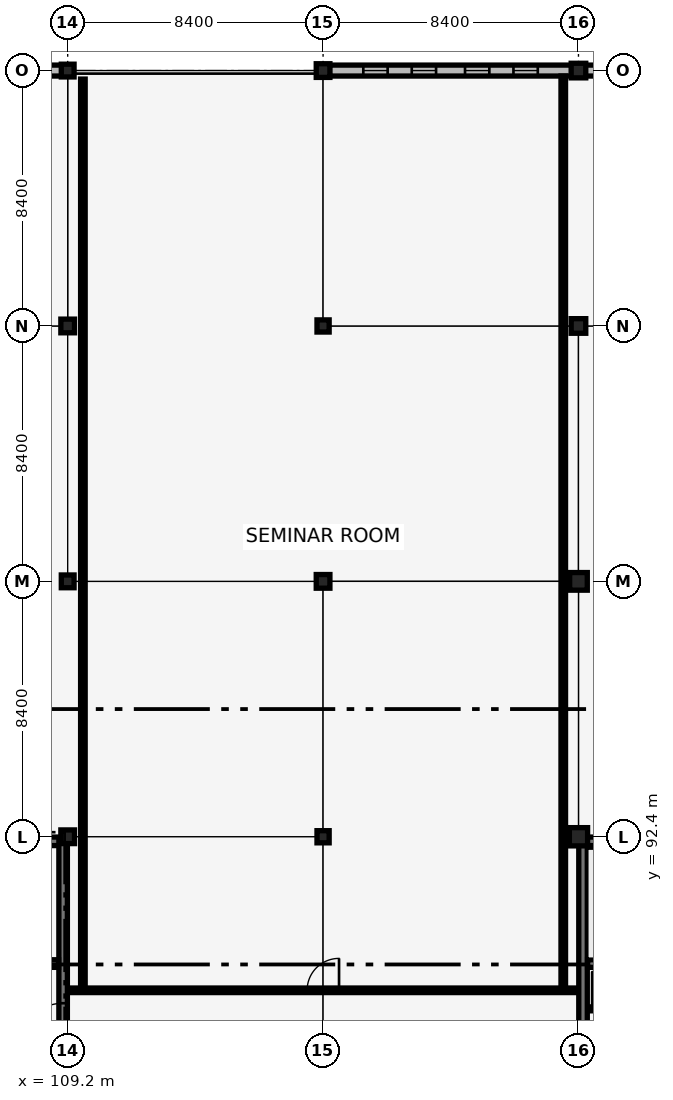
"""IFC4 building model, lengths in metres.
Left out: names, types, materials, properties, quantities, classifications, styles, units other than length and angle.
Written with IfcOpenShell. Run it as: python <this file> out.ifc"""

import sys

from ifc_helpers import new_model, si_unit, direction, frame, frame_2d, origin, origin_2d, place, context, subcontext, project, spatial, rectangle, extrude, element, fill, save


model = new_model("IFC4")
c1 = context("Model", 3, precision=1e-05, world=origin(), true_north=direction((0.0, 1.0)))
c2 = subcontext(c1, "Body", "Model", "MODEL_VIEW")
j1 = project(units=[si_unit("LENGTHUNIT", "METRE"), si_unit("PLANEANGLEUNIT", "RADIAN")], contexts=[c1])
p1 = place(None, origin())
s1 = spatial("IfcSite", under=j1, at=p1, CompositionType="ELEMENT")
p2 = place(p1, origin())
s2 = spatial("IfcBuilding", under=s1, at=p2, CompositionType="ELEMENT")
p3 = place(p2, frame((0.0, 0.0, 18.02)))
s3 = spatial("IfcBuildingStorey", under=s2, at=p3, CompositionType="ELEMENT", Elevation=18.02)
for number, where, z_axis, x_axis in (
    (1, (126.15, 92.25, 0.0), (0.0, 0.0, 1.0), (1.0, 0.0, 0.0)),
    (2, (126.15, 84.15, 0.0), (0.0, 0.0, 1.0), (0.0, 1.0, 0.0)),
):
    element("IfcWall", number, at=place(p3, frame(where, z_axis=z_axis, x_axis=x_axis)), inside=s3, PredefinedType="SHEAR", context=c2, shape_type="SweptSolid", body=[
        extrude(rectangle(XDim=8.1, YDim=0.28, at=frame_2d((4.05, 0.0))), origin(), (0.0, 0.0, 1.0), 3.78),
    ])
p4 = place(p3, frame((126.3, 88.23, 0.0), z_axis=(0.0, 0.0, 1.0), x_axis=(1.0, 0.0, 0.0)))
e3 = element("IfcWall", 3, at=p4, inside=s3, PredefinedType="SHEAR", context=c2, shape_type="SweptSolid", body=[
    extrude(rectangle(XDim=7.8, YDim=0.25, at=frame_2d((3.9, 0.0))), origin(), (0.0, 0.0, 1.0), 3.78),
])
p5 = place(p4, frame((6.2, 0.0, 0.0)))
e4 = element("IfcOpeningElement", 4, at=p5, cuts=e3, PredefinedType="OPENING", context=c2, shape_type="SweptSolid", body=[
    extrude(rectangle(XDim=1.35, YDim=2.15, at=frame_2d((0.675, 1.075))), frame((0.0, 0.135, 0.0), z_axis=(0.0, -1.0, 0.0), x_axis=(1.0, 0.0, 0.0)), (0.0, 0.0, 1.0), 0.27),
])
p6 = place(p3, frame((100.95, 92.25, 0.0), z_axis=(0.0, 0.0, 1.0), x_axis=(1.0, 0.0, 0.0)))
e5 = element("IfcWall", 5, at=p6, inside=s3, PredefinedType="SHEAR", context=c2, shape_type="SweptSolid", body=[
    extrude(rectangle(XDim=8.1, YDim=0.28, at=frame_2d((4.05, 0.0))), origin(), (0.0, 0.0, 1.0), 3.78),
])
p7 = place(p3, frame((109.05, 84.15, 0.0), z_axis=(0.0, 0.0, 1.0), x_axis=(0.0, 1.0, 0.0)))
e6 = element("IfcWall", 6, at=p7, inside=s3, PredefinedType="SHEAR", context=c2, shape_type="SweptSolid", body=[
    extrude(rectangle(XDim=8.1, YDim=0.28, at=frame_2d((4.05, 0.0))), origin(), (0.0, 0.0, 1.0), 3.78),
])
p8 = place(p7, frame((1.325, 0.0, 0.0)))
e7 = element("IfcOpeningElement", 7, at=p8, cuts=e6, PredefinedType="OPENING", context=c2, shape_type="SweptSolid", body=[
    extrude(rectangle(XDim=1.45, YDim=2.15, at=frame_2d((0.725, 1.075))), frame((0.0, 0.15, 0.0), z_axis=(0.0, -1.0, 0.0), x_axis=(1.0, 0.0, 0.0)), (0.0, 0.0, 1.0), 0.3),
])
p9 = place(p3, frame((101.1, 88.23, 0.0), z_axis=(0.0, 0.0, 1.0), x_axis=(1.0, 0.0, 0.0)))
e8 = element("IfcWall", 8, at=p9, inside=s3, PredefinedType="SHEAR", context=c2, shape_type="SweptSolid", body=[
    extrude(rectangle(XDim=7.8, YDim=0.25, at=frame_2d((3.9, 0.0))), origin(), (0.0, 0.0, 1.0), 3.78),
])
p10 = place(p9, frame((6.2, 0.0, 0.0)))
e9 = element("IfcOpeningElement", 9, at=p10, cuts=e8, PredefinedType="OPENING", context=c2, shape_type="SweptSolid", body=[
    extrude(rectangle(XDim=1.35, YDim=2.15, at=frame_2d((0.675, 1.075))), frame((0.0, 0.135, 0.0), z_axis=(0.0, -1.0, 0.0), x_axis=(1.0, 0.0, 0.0)), (0.0, 0.0, 1.0), 0.27),
])
p11 = place(p3, frame((109.2, 92.4, 0.0), z_axis=(0.0, 0.0, 1.0), x_axis=(1.0, 0.0, 0.0)))
e10 = element("IfcColumn", 10, at=p11, inside=s3, PredefinedType="COLUMN", context=c2, shape_type="SweptSolid", body=[
    extrude(rectangle(XDim=0.45, YDim=0.45, at=origin_2d()), origin(), (0.0, 0.0, 1.0), 3.78),
])
p12 = place(p3, frame((109.2, 100.8, 0.0), z_axis=(0.0, 0.0, 1.0), x_axis=(1.0, 0.0, 0.0)))
e11 = element("IfcColumn", 11, at=p12, inside=s3, PredefinedType="COLUMN", context=c2, shape_type="SweptSolid", body=[
    extrude(rectangle(XDim=0.42, YDim=0.42, at=origin_2d()), origin(), (0.0, 0.0, 1.0), 3.78),
])
p13 = place(p3, frame((109.2, 109.2, 0.0), z_axis=(0.0, 0.0, 1.0), x_axis=(1.0, 0.0, 0.0)))
e12 = element("IfcColumn", 12, at=p13, inside=s3, PredefinedType="COLUMN", context=c2, shape_type="SweptSolid", body=[
    extrude(rectangle(XDim=0.45, YDim=0.45, at=origin_2d()), origin(), (0.0, 0.0, 1.0), 3.78),
])
p14 = place(p3, frame((109.2, 117.6, 0.0), z_axis=(0.0, 0.0, 1.0), x_axis=(1.0, 0.0, 0.0)))
e13 = element("IfcColumn", 13, at=p14, inside=s3, PredefinedType="COLUMN", context=c2, shape_type="SweptSolid", body=[
    extrude(rectangle(XDim=0.42, YDim=0.42, at=origin_2d()), origin(), (0.0, 0.0, 1.0), 3.78),
])
p15 = place(p3, frame((117.6, 92.4, 0.0), z_axis=(0.0, 0.0, 1.0), x_axis=(1.0, 0.0, 0.0)))
e14 = element("IfcColumn", 14, at=p15, inside=s3, PredefinedType="COLUMN", context=c2, shape_type="SweptSolid", body=[
    extrude(rectangle(XDim=0.4, YDim=0.4, at=origin_2d()), origin(), (0.0, 0.0, 1.0), 3.78),
])
p16 = place(p3, frame((117.6, 100.8, 0.0), z_axis=(0.0, 0.0, 1.0), x_axis=(1.0, 0.0, 0.0)))
e15 = element("IfcColumn", 15, at=p16, inside=s3, PredefinedType="COLUMN", context=c2, shape_type="SweptSolid", body=[
    extrude(rectangle(XDim=0.45, YDim=0.45, at=origin_2d()), origin(), (0.0, 0.0, 1.0), 3.78),
])
p17 = place(p3, frame((117.6, 109.2, 0.0), z_axis=(0.0, 0.0, 1.0), x_axis=(1.0, 0.0, 0.0)))
e16 = element("IfcColumn", 16, at=p17, inside=s3, PredefinedType="COLUMN", context=c2, shape_type="SweptSolid", body=[
    extrude(rectangle(XDim=0.4, YDim=0.4, at=origin_2d()), origin(), (0.0, 0.0, 1.0), 3.78),
])
p18 = place(p3, frame((117.6, 117.6, 0.0), z_axis=(0.0, 0.0, 1.0), x_axis=(1.0, 0.0, 0.0)))
e17 = element("IfcColumn", 17, at=p18, inside=s3, PredefinedType="COLUMN", context=c2, shape_type="SweptSolid", body=[
    extrude(rectangle(XDim=0.45, YDim=0.45, at=origin_2d()), origin(), (0.0, 0.0, 1.0), 3.78),
])
p19 = place(p3, frame((126.0, 92.4, 0.0), z_axis=(0.0, 0.0, 1.0), x_axis=(1.0, 0.0, 0.0)))
e18 = element("IfcColumn", 18, at=p19, inside=s3, PredefinedType="COLUMN", context=c2, shape_type="SweptSolid", body=[
    extrude(rectangle(XDim=0.6, YDim=0.6, at=origin_2d()), origin(), (0.0, 0.0, 1.0), 3.78),
])
p20 = place(p3, frame((126.0, 100.8, 0.0), z_axis=(0.0, 0.0, 1.0), x_axis=(1.0, 0.0, 0.0)))
e19 = element("IfcColumn", 19, at=p20, inside=s3, PredefinedType="COLUMN", context=c2, shape_type="SweptSolid", body=[
    extrude(rectangle(XDim=0.58, YDim=0.58, at=origin_2d()), origin(), (0.0, 0.0, 1.0), 3.78),
])
for number, where, z_axis, x_axis in (
    (20, (126.0, 109.2, 0.0), (0.0, 0.0, 1.0), (1.0, 0.0, 0.0)),
    (21, (126.0, 117.6, 0.0), (0.0, 0.0, 1.0), (1.0, 0.0, 0.0)),
):
    element("IfcColumn", number, at=place(p3, frame(where, z_axis=z_axis, x_axis=x_axis)), inside=s3, PredefinedType="COLUMN", context=c2, shape_type="SweptSolid", body=[
        extrude(rectangle(XDim=0.48, YDim=0.48, at=origin_2d()), origin(), (0.0, 0.0, 1.0), 3.78),
    ])
p21 = place(p3, frame((101.025, 117.6, 0.0), z_axis=(0.0, 0.0, 1.0), x_axis=(1.0, 0.0, 0.0)))
e22 = element("IfcWall", 22, at=p21, inside=s3, PredefinedType="SOLIDWALL", context=c2, shape_type="SweptSolid", body=[
    extrude(rectangle(XDim=7.98, YDim=0.36, at=frame_2d((3.99, 0.0))), origin(), (0.0, 0.0, 1.0), 3.78),
])
p22 = place(p21, frame((1.146, 0.0, 0.75)))
e23 = element("IfcOpeningElement", 23, at=p22, cuts=e22, PredefinedType="OPENING", context=c2, shape_type="SweptSolid", body=[
    extrude(rectangle(XDim=0.74, YDim=2.3, at=frame_2d((0.37, 1.15))), frame((0.0, 0.19, 0.0), z_axis=(0.0, -1.0, 0.0), x_axis=(1.0, 0.0, 0.0)), (0.0, 0.0, 1.0), 0.38),
])
p23 = place(p21, frame((2.742, 0.0, 0.75)))
e24 = element("IfcOpeningElement", 24, at=p23, cuts=e22, PredefinedType="OPENING", context=c2, shape_type="SweptSolid", body=[
    extrude(rectangle(XDim=0.74, YDim=2.3, at=frame_2d((0.37, 1.15))), frame((0.0, 0.19, 0.0), z_axis=(0.0, -1.0, 0.0), x_axis=(1.0, 0.0, 0.0)), (0.0, 0.0, 1.0), 0.38),
])
p24 = place(p21, frame((4.498, 0.0, 0.75)))
e25 = element("IfcOpeningElement", 25, at=p24, cuts=e22, PredefinedType="OPENING", context=c2, shape_type="SweptSolid", body=[
    extrude(rectangle(XDim=0.74, YDim=2.3, at=frame_2d((0.37, 1.15))), frame((0.0, 0.19, 0.0), z_axis=(0.0, -1.0, 0.0), x_axis=(1.0, 0.0, 0.0)), (0.0, 0.0, 1.0), 0.38),
])
p25 = place(p21, frame((6.094, 0.0, 0.75)))
e26 = element("IfcOpeningElement", 26, at=p25, cuts=e22, PredefinedType="OPENING", context=c2, shape_type="SweptSolid", body=[
    extrude(rectangle(XDim=0.74, YDim=2.3, at=frame_2d((0.37, 1.15))), frame((0.0, 0.19, 0.0), z_axis=(0.0, -1.0, 0.0), x_axis=(1.0, 0.0, 0.0)), (0.0, 0.0, 1.0), 0.38),
])
p26 = place(p3, frame((117.81, 117.6, 0.0), z_axis=(0.0, 0.0, 1.0), x_axis=(1.0, 0.0, 0.0)))
e27 = element("IfcWall", 27, at=p26, inside=s3, PredefinedType="SOLIDWALL", context=c2, shape_type="SweptSolid", body=[
    extrude(rectangle(XDim=7.965, YDim=0.36, at=frame_2d((3.982, 0.0))), origin(), (0.0, 0.0, 1.0), 3.78),
])
p27 = place(p26, frame((1.113, 0.0, 0.75)))
e28 = element("IfcOpeningElement", 28, at=p27, cuts=e27, PredefinedType="OPENING", context=c2, shape_type="SweptSolid", body=[
    extrude(rectangle(XDim=0.8, YDim=2.55, at=frame_2d((0.4, 1.275))), frame((0.0, 0.19, 0.0), z_axis=(0.0, -1.0, 0.0), x_axis=(1.0, 0.0, 0.0)), (0.0, 0.0, 1.0), 0.38),
])
p28 = place(p26, frame((2.706, 0.0, 0.75)))
e29 = element("IfcOpeningElement", 29, at=p28, cuts=e27, PredefinedType="OPENING", context=c2, shape_type="SweptSolid", body=[
    extrude(rectangle(XDim=0.8, YDim=2.55, at=frame_2d((0.4, 1.275))), frame((0.0, 0.19, 0.0), z_axis=(0.0, -1.0, 0.0), x_axis=(1.0, 0.0, 0.0)), (0.0, 0.0, 1.0), 0.38),
])
p29 = place(p26, frame((4.459, 0.0, 0.75)))
e30 = element("IfcOpeningElement", 30, at=p29, cuts=e27, PredefinedType="OPENING", context=c2, shape_type="SweptSolid", body=[
    extrude(rectangle(XDim=0.8, YDim=2.55, at=frame_2d((0.4, 1.275))), frame((0.0, 0.19, 0.0), z_axis=(0.0, -1.0, 0.0), x_axis=(1.0, 0.0, 0.0)), (0.0, 0.0, 1.0), 0.38),
])
p30 = place(p26, frame((6.052, 0.0, 0.75)))
e31 = element("IfcOpeningElement", 31, at=p30, cuts=e27, PredefinedType="OPENING", context=c2, shape_type="SweptSolid", body=[
    extrude(rectangle(XDim=0.8, YDim=2.55, at=frame_2d((0.4, 1.275))), frame((0.0, 0.19, 0.0), z_axis=(0.0, -1.0, 0.0), x_axis=(1.0, 0.0, 0.0)), (0.0, 0.0, 1.0), 0.38),
])
p31 = place(p3, frame((126.225, 117.6, 0.0), z_axis=(0.0, 0.0, 1.0), x_axis=(1.0, 0.0, 0.0)))
e32 = element("IfcWall", 32, at=p31, inside=s3, PredefinedType="SOLIDWALL", context=c2, shape_type="SweptSolid", body=[
    extrude(rectangle(XDim=7.965, YDim=0.36, at=frame_2d((3.982, 0.0))), origin(), (0.0, 0.0, 1.0), 3.78),
])
p32 = place(p31, frame((1.138, 0.0, 0.75)))
e33 = element("IfcOpeningElement", 33, at=p32, cuts=e32, PredefinedType="OPENING", context=c2, shape_type="SweptSolid", body=[
    extrude(rectangle(XDim=0.75, YDim=2.1, at=frame_2d((0.375, 1.05))), frame((0.0, 0.19, 0.0), z_axis=(0.0, -1.0, 0.0), x_axis=(1.0, 0.0, 0.0)), (0.0, 0.0, 1.0), 0.38),
])
p33 = place(p31, frame((2.731, 0.0, 0.75)))
e34 = element("IfcOpeningElement", 34, at=p33, cuts=e32, PredefinedType="OPENING", context=c2, shape_type="SweptSolid", body=[
    extrude(rectangle(XDim=0.75, YDim=2.1, at=frame_2d((0.375, 1.05))), frame((0.0, 0.19, 0.0), z_axis=(0.0, -1.0, 0.0), x_axis=(1.0, 0.0, 0.0)), (0.0, 0.0, 1.0), 0.38),
])
p34 = place(p31, frame((4.484, 0.0, 0.75)))
e35 = element("IfcOpeningElement", 35, at=p34, cuts=e32, PredefinedType="OPENING", context=c2, shape_type="SweptSolid", body=[
    extrude(rectangle(XDim=0.75, YDim=2.1, at=frame_2d((0.375, 1.05))), frame((0.0, 0.19, 0.0), z_axis=(0.0, -1.0, 0.0), x_axis=(1.0, 0.0, 0.0)), (0.0, 0.0, 1.0), 0.38),
])
p35 = place(p31, frame((6.077, 0.0, 0.75)))
e36 = element("IfcOpeningElement", 36, at=p35, cuts=e32, PredefinedType="OPENING", context=c2, shape_type="SweptSolid", body=[
    extrude(rectangle(XDim=0.75, YDim=2.1, at=frame_2d((0.375, 1.05))), frame((0.0, 0.19, 0.0), z_axis=(0.0, -1.0, 0.0), x_axis=(1.0, 0.0, 0.0)), (0.0, 0.0, 1.0), 0.38),
])
p36 = place(p3, frame((126.32, 86.74, 0.0), z_axis=(0.0, 0.0, 1.0), x_axis=(1.0, 0.0, 0.0)))
e37 = element("IfcWall", 37, at=p36, inside=s3, PredefinedType="PARTITIONING", context=c2, shape_type="SweptSolid", body=[
    extrude(rectangle(XDim=1.62, YDim=0.13, at=frame_2d((0.81, 0.0))), origin(), (0.0, 0.0, 1.0), 3.78),
])
p37 = place(p3, frame((109.23, 87.35, 0.0), z_axis=(0.0, 0.0, 1.0), x_axis=(1.0, 0.0, 0.0)))
e38 = element("IfcWall", 38, at=p37, inside=s3, PredefinedType="PARTITIONING", context=c2, shape_type="SweptSolid", body=[
    extrude(rectangle(XDim=16.74, YDim=0.15, at=frame_2d((8.37, 0.0))), origin(), (0.0, 0.0, 1.0), 3.18),
])
p38 = place(p37, frame((7.845, 0.0, 0.0)))
e39 = element("IfcOpeningElement", 39, at=p38, cuts=e38, PredefinedType="OPENING", context=c2, shape_type="SweptSolid", body=[
    extrude(rectangle(XDim=1.05, YDim=2.15, at=frame_2d((0.525, 1.075))), frame((0.0, 0.085, 0.0), z_axis=(0.0, -1.0, 0.0), x_axis=(1.0, 0.0, 0.0)), (0.0, 0.0, 1.0), 0.17),
])
p39 = place(p3, frame((109.7, 87.5, 0.0), z_axis=(0.0, 0.0, 1.0), x_axis=(0.0, 1.0, 0.0)))
e40 = element("IfcWall", 40, at=p39, inside=s3, PredefinedType="PARTITIONING", context=c2, shape_type="SweptSolid", body=[
    extrude(rectangle(XDim=29.82, YDim=0.15, at=frame_2d((14.91, 0.0))), origin(), (0.0, 0.0, 1.0), 3.78),
])
p40 = place(p3, frame((125.5, 87.5, 0.0), z_axis=(0.0, 0.0, 1.0), x_axis=(0.0, 1.0, 0.0)))
e41 = element("IfcWall", 41, at=p40, inside=s3, PredefinedType="PARTITIONING", context=c2, shape_type="SweptSolid", body=[
    extrude(rectangle(XDim=29.92, YDim=0.15, at=frame_2d((14.96, 0.0))), origin(), (0.0, 0.0, 1.0), 3.78),
])
p41 = place(p27, origin())
e42 = element("IfcWindow", 42, at=p41, inside=s3, PartitioningType="DOUBLE_PANEL_VERTICAL", PredefinedType="WINDOW", context=c2, shape_type="SweptSolid", body=[
    extrude(rectangle(XDim=0.8, YDim=2.55, at=frame_2d((0.4, 1.275))), frame((0.0, 0.03, 0.0), z_axis=(0.0, -1.0, 0.0), x_axis=(1.0, 0.0, 0.0)), (0.0, 0.0, 1.0), 0.06),
])
fill(e28, e42)
p42 = place(p28, origin())
e43 = element("IfcWindow", 43, at=p42, inside=s3, PartitioningType="DOUBLE_PANEL_VERTICAL", PredefinedType="WINDOW", context=c2, shape_type="SweptSolid", body=[
    extrude(rectangle(XDim=0.8, YDim=2.55, at=frame_2d((0.4, 1.275))), frame((0.0, 0.03, 0.0), z_axis=(0.0, -1.0, 0.0), x_axis=(1.0, 0.0, 0.0)), (0.0, 0.0, 1.0), 0.06),
])
fill(e29, e43)
p43 = place(p29, origin())
e44 = element("IfcWindow", 44, at=p43, inside=s3, PartitioningType="DOUBLE_PANEL_VERTICAL", PredefinedType="WINDOW", context=c2, shape_type="SweptSolid", body=[
    extrude(rectangle(XDim=0.8, YDim=2.55, at=frame_2d((0.4, 1.275))), frame((0.0, 0.03, 0.0), z_axis=(0.0, -1.0, 0.0), x_axis=(1.0, 0.0, 0.0)), (0.0, 0.0, 1.0), 0.06),
])
fill(e30, e44)
p44 = place(p30, origin())
e45 = element("IfcWindow", 45, at=p44, inside=s3, PartitioningType="DOUBLE_PANEL_VERTICAL", PredefinedType="WINDOW", context=c2, shape_type="SweptSolid", body=[
    extrude(rectangle(XDim=0.8, YDim=2.55, at=frame_2d((0.4, 1.275))), frame((0.0, 0.03, 0.0), z_axis=(0.0, -1.0, 0.0), x_axis=(1.0, 0.0, 0.0)), (0.0, 0.0, 1.0), 0.06),
])
fill(e31, e45)
p45 = place(p8, origin())
e46 = element("IfcDoor", 46, at=p45, inside=s3, OperationType="DOUBLE_DOOR_SINGLE_SWING", PredefinedType="DOOR", context=c2, shape_type="SweptSolid", body=[
    extrude(rectangle(XDim=1.45, YDim=2.15, at=frame_2d((0.725, 1.075))), frame((0.0, 0.025, 0.0), z_axis=(0.0, -1.0, 0.0), x_axis=(1.0, 0.0, 0.0)), (0.0, 0.0, 1.0), 0.05),
])
fill(e7, e46)
p46 = place(p38, origin())
e47 = element("IfcDoor", 47, at=p46, inside=s3, OperationType="SINGLE_SWING_RIGHT", PredefinedType="DOOR", context=c2, shape_type="SweptSolid", body=[
    extrude(rectangle(XDim=1.05, YDim=2.15, at=frame_2d((0.525, 1.075))), frame((0.0, 0.025, 0.0), z_axis=(0.0, -1.0, 0.0), x_axis=(1.0, 0.0, 0.0)), (0.0, 0.0, 1.0), 0.05),
])
fill(e39, e47)
save(model, sys.argv[1])
